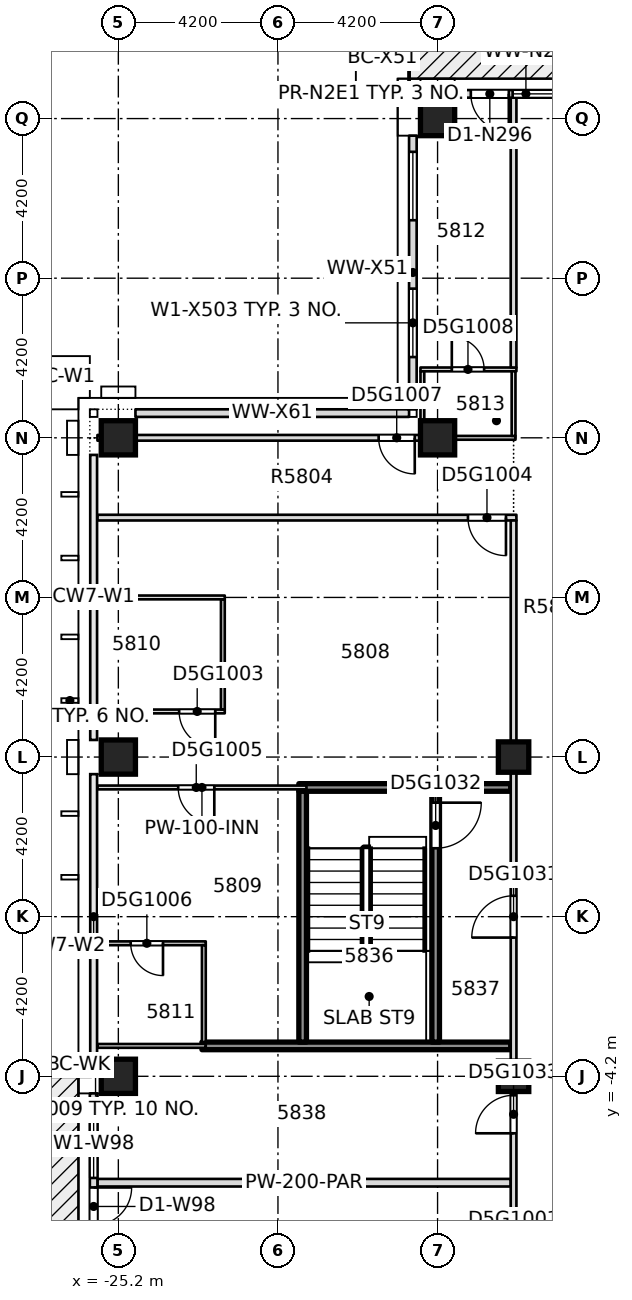
"""IFC4 building model, lengths in metres.
Left out: names, types, materials, properties, quantities, classifications, styles, units other than length and angle.
Written with IfcOpenShell. Run it as: python <this file> out.ifc"""

import sys

from ifc_helpers import new_model, si_unit, direction, frame, frame_2d, origin, origin_2d, place, context, subcontext, project, spatial, rectangle, extrude, element, fill, save


model = new_model("IFC4")
c1 = context("Model", 3, precision=1e-05, world=origin(), true_north=direction((0.0, 1.0)))
c2 = subcontext(c1, "Body", "Model", "MODEL_VIEW")
j1 = project(units=[si_unit("LENGTHUNIT", "METRE"), si_unit("PLANEANGLEUNIT", "RADIAN")], contexts=[c1])
p1 = place(None, origin())
s1 = spatial("IfcSite", under=j1, at=p1, CompositionType="ELEMENT")
p2 = place(p1, origin())
s2 = spatial("IfcBuilding", under=s1, at=p2, CompositionType="ELEMENT")
p3 = place(p2, frame((0.0, 0.0, 223.45)))
s3 = spatial("IfcBuildingStorey", under=s2, at=p3, CompositionType="ELEMENT", Elevation=223.45)
for number, where, z_axis, x_axis in (
    (1, (-25.2, -4.2, -0.4), (0.0, 0.0, 1.0), (1.0, 0.0, 0.0)),
    (2, (-25.2, 4.2, -0.4), (0.0, 0.0, 1.0), (1.0, 0.0, 0.0)),
    (3, (-25.2, 12.6, -0.4), (0.0, 0.0, 1.0), (1.0, 0.0, 0.0)),
    (4, (-16.8, 12.6, -0.4), (0.0, 0.0, 1.0), (1.0, 0.0, 0.0)),
    (5, (-16.8, 21.0, -0.4), (0.0, 0.0, 1.0), (1.0, 0.0, 0.0)),
):
    element("IfcColumn", number, at=place(p3, frame(where, z_axis=z_axis, x_axis=x_axis)), inside=s3, PredefinedType="COLUMN", context=c2, shape_type="SweptSolid", body=[
        extrude(rectangle(XDim=0.9, YDim=0.9, at=origin_2d()), origin(), (0.0, 0.0, 1.0), 3.45),
    ])
for number, where, z_axis, x_axis in (
    (6, (-14.8, -4.2, -0.4), (0.0, 0.0, 1.0), (1.0, 0.0, 0.0)),
    (7, (-14.8, 4.2, -0.4), (0.0, 0.0, 1.0), (1.0, 0.0, 0.0)),
):
    element("IfcColumn", number, at=place(p3, frame(where, z_axis=z_axis, x_axis=x_axis)), inside=s3, PredefinedType="COLUMN", context=c2, shape_type="SweptSolid", body=[
        extrude(rectangle(XDim=0.8, YDim=0.8, at=origin_2d()), origin(), (0.0, 0.0, 1.0), 3.45),
    ])
p4 = place(p3, frame((-25.75, -7.0, 0.0), z_axis=(0.0, 0.0, 1.0), x_axis=(1.0, 0.0, 0.0)))
e8 = element("IfcWall", 8, at=p4, inside=s3, PredefinedType="PARTITIONING", context=c2, shape_type="SweptSolid", body=[
    extrude(rectangle(XDim=10.875, YDim=0.2, at=frame_2d((5.438, 0.0))), origin(), (0.0, 0.0, 1.0), 3.05),
])
p5 = place(p3, frame((-25.75, -3.4, 0.0), z_axis=(0.0, 0.0, 1.0), x_axis=(1.0, 0.0, 0.0)))
e9 = element("IfcWall", 9, at=p5, inside=s3, PredefinedType="PARTITIONING", context=c2, shape_type="SweptSolid", body=[
    extrude(rectangle(XDim=2.85, YDim=0.1, at=frame_2d((1.425, 0.0))), origin(), (0.0, 0.0, 1.0), 3.05),
])
p6 = place(p3, frame((-23.0, -3.4, 0.0), z_axis=(0.0, 0.0, 1.0), x_axis=(1.0, 0.0, 0.0)))
e10 = element("IfcWall", 10, at=p6, inside=s3, PredefinedType="SOLIDWALL", context=c2, shape_type="SweptSolid", body=[
    extrude(rectangle(XDim=8.125, YDim=0.2, at=frame_2d((4.062, 0.0))), origin(), (0.0, 0.0, 1.0), 3.05),
])
p7 = place(p3, frame((-25.75, -0.7, 0.0), z_axis=(0.0, 0.0, 1.0), x_axis=(1.0, 0.0, 0.0)))
e11 = element("IfcWall", 11, at=p7, inside=s3, PredefinedType="PARTITIONING", context=c2, shape_type="SweptSolid", body=[
    extrude(rectangle(XDim=2.85, YDim=0.1, at=frame_2d((1.425, 0.0))), origin(), (0.0, 0.0, 1.0), 3.05),
])
p8 = place(p7, frame((0.875, 0.0, 0.0)))
e12 = element("IfcOpeningElement", 12, at=p8, cuts=e11, PredefinedType="OPENING", context=c2, shape_type="SweptSolid", body=[
    extrude(rectangle(XDim=0.85, YDim=2.1, at=frame_2d((0.425, 1.05))), frame((0.0, 0.06, 0.0), z_axis=(0.0, -1.0, 0.0), x_axis=(1.0, 0.0, 0.0)), (0.0, 0.0, 1.0), 0.12),
])
p9 = place(p3, frame((-25.75, 3.4, 0.0), z_axis=(0.0, 0.0, 1.0), x_axis=(1.0, 0.0, 0.0)))
e13 = element("IfcWall", 13, at=p9, inside=s3, PredefinedType="PARTITIONING", context=c2, shape_type="SweptSolid", body=[
    extrude(rectangle(XDim=5.5, YDim=0.1, at=frame_2d((2.75, 0.0))), origin(), (0.0, 0.0, 1.0), 3.05),
])
p10 = place(p9, frame((2.125, 0.0, 0.0)))
e14 = element("IfcOpeningElement", 14, at=p10, cuts=e13, PredefinedType="OPENING", context=c2, shape_type="SweptSolid", body=[
    extrude(rectangle(XDim=0.95, YDim=2.1, at=frame_2d((0.475, 1.05))), frame((0.0, 0.06, 0.0), z_axis=(0.0, -1.0, 0.0), x_axis=(1.0, 0.0, 0.0)), (0.0, 0.0, 1.0), 0.12),
])
p11 = place(p3, frame((-20.45, 3.4, 0.0), z_axis=(0.0, 0.0, 1.0), x_axis=(1.0, 0.0, 0.0)))
e15 = element("IfcWall", 15, at=p11, inside=s3, PredefinedType="SOLIDWALL", context=c2, shape_type="SweptSolid", body=[
    extrude(rectangle(XDim=5.575, YDim=0.2, at=frame_2d((2.788, 0.0))), origin(), (0.0, 0.0, 1.0), 3.05),
])
p12 = place(p3, frame((-25.75, 5.4, 0.0), z_axis=(0.0, 0.0, 1.0), x_axis=(1.0, 0.0, 0.0)))
e16 = element("IfcWall", 16, at=p12, inside=s3, PredefinedType="PARTITIONING", context=c2, shape_type="SweptSolid", body=[
    extrude(rectangle(XDim=3.35, YDim=0.1, at=frame_2d((1.675, 0.0))), origin(), (0.0, 0.0, 1.0), 3.05),
])
p13 = place(p12, frame((2.15, 0.0, 0.0)))
e17 = element("IfcOpeningElement", 17, at=p13, cuts=e16, PredefinedType="OPENING", context=c2, shape_type="SweptSolid", body=[
    extrude(rectangle(XDim=0.95, YDim=2.1, at=frame_2d((0.475, 1.05))), frame((0.0, 0.06, 0.0), z_axis=(0.0, -1.0, 0.0), x_axis=(1.0, 0.0, 0.0)), (0.0, 0.0, 1.0), 0.12),
])
p14 = place(p3, frame((-25.75, 8.4, 0.0), z_axis=(0.0, 0.0, 1.0), x_axis=(1.0, 0.0, 0.0)))
e18 = element("IfcWall", 18, at=p14, inside=s3, PredefinedType="PARTITIONING", context=c2, shape_type="SweptSolid", body=[
    extrude(rectangle(XDim=3.35, YDim=0.1, at=frame_2d((1.675, 0.0))), origin(), (0.0, 0.0, 1.0), 3.05),
])
p15 = place(p3, frame((-25.75, 10.5, 0.0), z_axis=(0.0, 0.0, 1.0), x_axis=(1.0, 0.0, 0.0)))
e19 = element("IfcWall", 19, at=p15, inside=s3, PredefinedType="PARTITIONING", context=c2, shape_type="SweptSolid", body=[
    extrude(rectangle(XDim=11.025, YDim=0.15, at=frame_2d((5.512, 0.0))), origin(), (0.0, 0.0, 1.0), 3.05),
])
p16 = place(p15, frame((9.75, 0.0, 0.0)))
e20 = element("IfcOpeningElement", 20, at=p16, cuts=e19, PredefinedType="OPENING", context=c2, shape_type="SweptSolid", body=[
    extrude(rectangle(XDim=1.0, YDim=2.1, at=frame_2d((0.5, 1.05))), frame((0.0, 0.085, 0.0), z_axis=(0.0, -1.0, 0.0), x_axis=(1.0, 0.0, 0.0)), (0.0, 0.0, 1.0), 0.17),
])
p17 = place(p3, frame((-25.75, 12.6, 0.0), z_axis=(0.0, 0.0, 1.0), x_axis=(1.0, 0.0, 0.0)))
e21 = element("IfcWall", 21, at=p17, inside=s3, PredefinedType="PARTITIONING", context=c2, shape_type="SweptSolid", body=[
    extrude(rectangle(XDim=1.0, YDim=0.15, at=frame_2d((0.5, 0.0))), origin(), (0.0, 0.0, 1.0), 3.05),
])
p18 = place(p3, frame((-17.25, 12.6, 0.0), z_axis=(0.0, 0.0, 1.0), x_axis=(1.0, 0.0, 0.0)))
e22 = element("IfcWall", 22, at=p18, inside=s3, PredefinedType="PARTITIONING", context=c2, shape_type="SweptSolid", body=[
    extrude(rectangle(XDim=2.5, YDim=0.1, at=frame_2d((1.25, 0.0))), origin(), (0.0, 0.0, 1.0), 3.05),
])
p19 = place(p3, frame((-17.25, 14.4, 0.0), z_axis=(0.0, 0.0, 1.0), x_axis=(1.0, 0.0, 0.0)))
e23 = element("IfcWall", 23, at=p19, inside=s3, PredefinedType="PARTITIONING", context=c2, shape_type="SweptSolid", body=[
    extrude(rectangle(XDim=2.525, YDim=0.1, at=frame_2d((1.262, 0.0))), origin(), (0.0, 0.0, 1.0), 3.05),
])
p20 = place(p19, frame((0.825, 0.0, 0.0)))
e24 = element("IfcOpeningElement", 24, at=p20, cuts=e23, PredefinedType="OPENING", context=c2, shape_type="SweptSolid", body=[
    extrude(rectangle(XDim=0.85, YDim=2.1, at=frame_2d((0.425, 1.05))), frame((0.0, 0.06, 0.0), z_axis=(0.0, -1.0, 0.0), x_axis=(1.0, 0.0, 0.0)), (0.0, 0.0, 1.0), 0.12),
])
p21 = place(p3, frame((-22.95, -3.3, 0.0), z_axis=(0.0, 0.0, 1.0), x_axis=(0.0, 1.0, 0.0)))
e25 = element("IfcWall", 25, at=p21, inside=s3, PredefinedType="PARTITIONING", context=c2, shape_type="SweptSolid", body=[
    extrude(rectangle(XDim=2.55, YDim=0.1, at=frame_2d((1.275, 0.0))), origin(), (0.0, 0.0, 1.0), 3.05),
])
p22 = place(p3, frame((-22.45, 5.45, 0.0), z_axis=(0.0, 0.0, 1.0), x_axis=(0.0, 1.0, 0.0)))
e26 = element("IfcWall", 26, at=p22, inside=s3, PredefinedType="PARTITIONING", context=c2, shape_type="SweptSolid", body=[
    extrude(rectangle(XDim=2.9, YDim=0.1, at=frame_2d((1.45, 0.0))), origin(), (0.0, 0.0, 1.0), 3.05),
])
p23 = place(p3, frame((-20.35, -3.3, 0.0), z_axis=(0.0, 0.0, 1.0), x_axis=(0.0, 1.0, 0.0)))
e27 = element("IfcWall", 27, at=p23, inside=s3, PredefinedType="SOLIDWALL", context=c2, shape_type="SweptSolid", body=[
    extrude(rectangle(XDim=6.6, YDim=0.2, at=frame_2d((3.3, 0.0))), origin(), (0.0, 0.0, 1.0), 3.05),
])
p24 = place(p3, frame((-17.2, 12.675, 0.0), z_axis=(0.0, 0.0, 1.0), x_axis=(0.0, 1.0, 0.0)))
e28 = element("IfcWall", 28, at=p24, inside=s3, PredefinedType="PARTITIONING", context=c2, shape_type="SweptSolid", body=[
    extrude(rectangle(XDim=1.675, YDim=0.1, at=frame_2d((0.837, 0.0))), origin(), (0.0, 0.0, 1.0), 3.05),
])
p25 = place(p3, frame((-16.85, -3.3, 0.0), z_axis=(0.0, 0.0, 1.0), x_axis=(0.0, 1.0, 0.0)))
e29 = element("IfcWall", 29, at=p25, inside=s3, PredefinedType="SOLIDWALL", context=c2, shape_type="SweptSolid", body=[
    extrude(rectangle(XDim=6.6, YDim=0.2, at=frame_2d((3.3, 0.0))), origin(), (0.0, 0.0, 1.0), 3.05),
])
p26 = place(p25, frame((5.1, 0.0, 0.0)))
e30 = element("IfcOpeningElement", 30, at=p26, cuts=e29, PredefinedType="OPENING", context=c2, shape_type="SweptSolid", body=[
    extrude(rectangle(XDim=1.2, YDim=2.1, at=frame_2d((0.6, 1.05))), frame((0.0, 0.11, 0.0), z_axis=(0.0, -1.0, 0.0), x_axis=(1.0, 0.0, 0.0)), (0.0, 0.0, 1.0), 0.22),
])
p27 = place(p3, frame((-14.8, -10.38, 0.0), z_axis=(0.0, 0.0, 1.0), x_axis=(0.0, 1.0, 0.0)))
e31 = element("IfcWall", 31, at=p27, inside=s3, PredefinedType="PARTITIONING", context=c2, shape_type="SweptSolid", body=[
    extrude(rectangle(XDim=20.805, YDim=0.15, at=frame_2d((10.402, 0.0))), origin(), (0.0, 0.0, 1.0), 3.05),
])
p28 = place(p27, frame((0.83, 0.0, 0.0)))
e32 = element("IfcOpeningElement", 32, at=p28, cuts=e31, PredefinedType="OPENING", context=c2, shape_type="SweptSolid", body=[
    extrude(rectangle(XDim=0.95, YDim=2.1, at=frame_2d((0.475, 1.05))), frame((0.0, 0.085, 0.0), z_axis=(0.0, -1.0, 0.0), x_axis=(1.0, 0.0, 0.0)), (0.0, 0.0, 1.0), 0.17),
])
p29 = place(p27, frame((9.83, 0.0, 0.0)))
e33 = element("IfcOpeningElement", 33, at=p29, cuts=e31, PredefinedType="OPENING", context=c2, shape_type="SweptSolid", body=[
    extrude(rectangle(XDim=1.1, YDim=2.1, at=frame_2d((0.55, 1.05))), frame((0.0, 0.085, 0.0), z_axis=(0.0, -1.0, 0.0), x_axis=(1.0, 0.0, 0.0)), (0.0, 0.0, 1.0), 0.17),
])
p30 = place(p27, frame((4.68, 0.0, 0.0)))
e34 = element("IfcOpeningElement", 34, at=p30, cuts=e31, PredefinedType="OPENING", context=c2, shape_type="SweptSolid", body=[
    extrude(rectangle(XDim=1.0, YDim=2.1, at=frame_2d((0.5, 1.05))), frame((0.0, 0.085, 0.0), z_axis=(0.0, -1.0, 0.0), x_axis=(1.0, 0.0, 0.0)), (0.0, 0.0, 1.0), 0.17),
])
p31 = place(p3, frame((-14.8, 12.65, 0.0), z_axis=(0.0, 0.0, 1.0), x_axis=(0.0, 1.0, 0.0)))
e35 = element("IfcWall", 35, at=p31, inside=s3, PredefinedType="PARTITIONING", context=c2, shape_type="SweptSolid", body=[
    extrude(rectangle(XDim=1.7, YDim=0.1, at=frame_2d((0.85, 0.0))), origin(), (0.0, 0.0, 1.0), 3.05),
])
p32 = place(p3, frame((-14.8, 14.45, 0.0), z_axis=(0.0, 0.0, 1.0), x_axis=(0.0, 1.0, 0.0)))
e36 = element("IfcWall", 36, at=p32, inside=s3, PredefinedType="PARTITIONING", context=c2, shape_type="SweptSolid", body=[
    extrude(rectangle(XDim=7.1, YDim=0.15, at=frame_2d((3.55, 0.0))), origin(), (0.0, 0.0, 1.0), 3.05),
])
p33 = place(p3, frame((-12.6, 21.65, 0.0), z_axis=(0.0, 0.0, 1.0), x_axis=(-1.0, 0.0, 0.0)))
e37 = element("IfcWall", 37, at=p33, inside=s3, PredefinedType="STANDARD", context=c2, shape_type="SweptSolid", body=[
    extrude(rectangle(XDim=3.75, YDim=0.2, at=frame_2d((1.875, 0.0))), origin(), (0.0, 0.0, 1.0), 3.05),
])
p34 = place(p33, frame((0.425, 0.0, 0.2)))
e38 = element("IfcOpeningElement", 38, at=p34, cuts=e37, PredefinedType="OPENING", context=c2, shape_type="SweptSolid", body=[
    extrude(rectangle(XDim=1.8, YDim=2.65, at=frame_2d((0.9, 1.325))), frame((0.0, 0.11, 0.0), z_axis=(0.0, -1.0, 0.0), x_axis=(1.0, 0.0, 0.0)), (0.0, 0.0, 1.0), 0.22),
])
p35 = place(p33, frame((2.325, 0.0, 0.0)))
e39 = element("IfcOpeningElement", 39, at=p35, cuts=e37, PredefinedType="OPENING", context=c2, shape_type="SweptSolid", body=[
    extrude(rectangle(XDim=1.0, YDim=2.4, at=frame_2d((0.5, 1.2))), frame((0.0, 0.11, 0.0), z_axis=(0.0, -1.0, 0.0), x_axis=(1.0, 0.0, 0.0)), (0.0, 0.0, 1.0), 0.22),
])
p36 = place(p3, frame((-17.45, 20.55, 0.0), z_axis=(0.0, 0.0, 1.0), x_axis=(0.0, -1.0, 0.0)))
e40 = element("IfcWall", 40, at=p36, inside=s3, PredefinedType="STANDARD", context=c2, shape_type="SweptSolid", body=[
    extrude(rectangle(XDim=7.2, YDim=0.2, at=frame_2d((3.6, 0.0))), origin(), (0.0, 0.0, 1.0), 3.05),
])
p37 = place(p36, frame((4.025, 0.0, 0.2)))
e41 = element("IfcOpeningElement", 41, at=p37, cuts=e40, PredefinedType="OPENING", context=c2, shape_type="SweptSolid", body=[
    extrude(rectangle(XDim=1.8, YDim=2.65, at=frame_2d((0.9, 1.325))), frame((0.0, 0.11, 0.0), z_axis=(0.0, -1.0, 0.0), x_axis=(1.0, 0.0, 0.0)), (0.0, 0.0, 1.0), 0.22),
])
p38 = place(p36, frame((0.425, 0.0, 0.2)))
e42 = element("IfcOpeningElement", 42, at=p38, cuts=e40, PredefinedType="OPENING", context=c2, shape_type="SweptSolid", body=[
    extrude(rectangle(XDim=1.8, YDim=2.65, at=frame_2d((0.9, 1.325))), frame((0.0, 0.11, 0.0), z_axis=(0.0, -1.0, 0.0), x_axis=(1.0, 0.0, 0.0)), (0.0, 0.0, 1.0), 0.22),
])
p39 = place(p3, frame((-17.55, 13.25, 0.0), z_axis=(0.0, 0.0, 1.0), x_axis=(-1.0, 0.0, 0.0)))
e43 = element("IfcWall", 43, at=p39, inside=s3, PredefinedType="STANDARD", context=c2, shape_type="SweptSolid", body=[
    extrude(rectangle(XDim=7.2, YDim=0.2, at=frame_2d((3.6, 0.0))), origin(), (0.0, 0.0, 1.0), 3.05),
])
p40 = place(p3, frame((-25.85, -4.65, 0.0), z_axis=(0.0, 0.0, 1.0), x_axis=(0.0, -1.0, 0.0)))
e44 = element("IfcWall", 44, at=p40, inside=s3, PredefinedType="STANDARD", context=c2, shape_type="SweptSolid", body=[
    extrude(rectangle(XDim=7.5, YDim=0.2, at=frame_2d((3.75, 0.0))), origin(), (0.0, 0.0, 1.0), 3.05),
])
p41 = place(p40, frame((4.175, 0.0, 0.2)))
e45 = element("IfcOpeningElement", 45, at=p41, cuts=e44, PredefinedType="OPENING", context=c2, shape_type="SweptSolid", body=[
    extrude(rectangle(XDim=1.8, YDim=2.65, at=frame_2d((0.9, 1.325))), frame((0.0, 0.11, 0.0), z_axis=(0.0, -1.0, 0.0), x_axis=(1.0, 0.0, 0.0)), (0.0, 0.0, 1.0), 0.22),
])
p42 = place(p40, frame((6.075, 0.0, 0.0)))
e46 = element("IfcOpeningElement", 46, at=p42, cuts=e44, PredefinedType="OPENING", context=c2, shape_type="SweptSolid", body=[
    extrude(rectangle(XDim=1.0, YDim=2.4, at=frame_2d((0.5, 1.2))), frame((0.0, 0.11, 0.0), z_axis=(0.0, -1.0, 0.0), x_axis=(1.0, 0.0, 0.0)), (0.0, 0.0, 1.0), 0.22),
])
p43 = place(p40, frame((0.425, 0.0, 0.2)))
e47 = element("IfcOpeningElement", 47, at=p43, cuts=e44, PredefinedType="OPENING", context=c2, shape_type="SweptSolid", body=[
    extrude(rectangle(XDim=1.8, YDim=2.65, at=frame_2d((0.9, 1.325))), frame((0.0, 0.11, 0.0), z_axis=(0.0, -1.0, 0.0), x_axis=(1.0, 0.0, 0.0)), (0.0, 0.0, 1.0), 0.22),
])
p44 = place(p40, frame((2.475, 0.0, 0.0)))
e48 = element("IfcOpeningElement", 48, at=p44, cuts=e44, PredefinedType="OPENING", context=c2, shape_type="SweptSolid", body=[
    extrude(rectangle(XDim=1.0, YDim=2.4, at=frame_2d((0.5, 1.2))), frame((0.0, 0.11, 0.0), z_axis=(0.0, -1.0, 0.0), x_axis=(1.0, 0.0, 0.0)), (0.0, 0.0, 1.0), 0.22),
])
p45 = place(p3, frame((-24.75, 12.6, 0.0), z_axis=(0.0, 0.0, 1.0), x_axis=(1.0, 0.0, 0.0)))
e49 = element("IfcWall", 49, at=p45, inside=s3, PredefinedType="PARTITIONING", context=c2, shape_type="SweptSolid", body=[
    extrude(rectangle(XDim=7.5, YDim=0.15, at=frame_2d((3.75, 0.0))), origin(), (0.0, 0.0, 1.0), 2.5),
])
p46 = place(p45, frame((6.4, 0.0, 0.0)))
e50 = element("IfcOpeningElement", 50, at=p46, cuts=e49, PredefinedType="OPENING", context=c2, shape_type="SweptSolid", body=[
    extrude(rectangle(XDim=0.95, YDim=2.1, at=frame_2d((0.475, 1.05))), frame((0.0, 0.085, 0.0), z_axis=(0.0, -1.0, 0.0), x_axis=(1.0, 0.0, 0.0)), (0.0, 0.0, 1.0), 0.17),
])
p47 = place(p3, frame((-17.25, 12.6, 0.0), z_axis=(0.0, 0.0, 1.0), x_axis=(1.0, 0.0, 0.0)))
e51 = element("IfcWall", 51, at=p47, inside=s3, PredefinedType="PARTITIONING", context=c2, shape_type="SweptSolid", body=[
    extrude(rectangle(XDim=0.1, YDim=0.15, at=frame_2d((0.05, 0.0))), origin(), (0.0, 0.0, 1.0), 3.05),
])
p48 = place(p13, origin())
e52 = element("IfcDoor", 52, at=p48, inside=s3, OperationType="SINGLE_SWING_RIGHT", PredefinedType="DOOR", context=c2, shape_type="SweptSolid", body=[
    extrude(rectangle(XDim=0.95, YDim=2.1, at=frame_2d((0.475, 1.05))), frame((0.0, 0.025, 0.0), z_axis=(0.0, -1.0, 0.0), x_axis=(1.0, 0.0, 0.0)), (0.0, 0.0, 1.0), 0.05),
])
fill(e17, e52)
p49 = place(p16, origin())
e53 = element("IfcDoor", 53, at=p49, inside=s3, OperationType="SINGLE_SWING_RIGHT", PredefinedType="DOOR", context=c2, shape_type="SweptSolid", body=[
    extrude(rectangle(XDim=1.0, YDim=2.1, at=frame_2d((0.5, 1.05))), frame((0.0, 0.025, 0.0), z_axis=(0.0, -1.0, 0.0), x_axis=(1.0, 0.0, 0.0)), (0.0, 0.0, 1.0), 0.05),
])
fill(e20, e53)
p50 = place(p10, origin())
e54 = element("IfcDoor", 54, at=p50, inside=s3, OperationType="SINGLE_SWING_LEFT", PredefinedType="DOOR", context=c2, shape_type="SweptSolid", body=[
    extrude(rectangle(XDim=0.95, YDim=2.1, at=frame_2d((0.475, 1.05))), frame((0.0, 0.025, 0.0), z_axis=(0.0, -1.0, 0.0), x_axis=(1.0, 0.0, 0.0)), (0.0, 0.0, 1.0), 0.05),
])
fill(e14, e54)
p51 = place(p8, origin())
e55 = element("IfcDoor", 55, at=p51, inside=s3, OperationType="SINGLE_SWING_RIGHT", PredefinedType="DOOR", context=c2, shape_type="SweptSolid", body=[
    extrude(rectangle(XDim=0.85, YDim=2.1, at=frame_2d((0.425, 1.05))), frame((0.0, 0.025, 0.0), z_axis=(0.0, -1.0, 0.0), x_axis=(1.0, 0.0, 0.0)), (0.0, 0.0, 1.0), 0.05),
])
fill(e12, e55)
p52 = place(p46, origin())
e56 = element("IfcDoor", 56, at=p52, inside=s3, OperationType="SINGLE_SWING_LEFT", PredefinedType="DOOR", context=c2, shape_type="SweptSolid", body=[
    extrude(rectangle(XDim=0.95, YDim=2.1, at=frame_2d((0.475, 1.05))), frame((0.0, 0.025, 0.0), z_axis=(0.0, -1.0, 0.0), x_axis=(1.0, 0.0, 0.0)), (0.0, 0.0, 1.0), 0.05),
])
fill(e50, e56)
p53 = place(p20, origin())
e57 = element("IfcDoor", 57, at=p53, inside=s3, OperationType="SINGLE_SWING_RIGHT", PredefinedType="DOOR", context=c2, shape_type="SweptSolid", body=[
    extrude(rectangle(XDim=0.85, YDim=2.1, at=frame_2d((0.425, 1.05))), frame((0.0, 0.025, 0.0), z_axis=(0.0, -1.0, 0.0), x_axis=(1.0, 0.0, 0.0)), (0.0, 0.0, 1.0), 0.05),
])
fill(e24, e57)
p54 = place(p29, origin())
e58 = element("IfcDoor", 58, at=p54, inside=s3, OperationType="SINGLE_SWING_RIGHT", PredefinedType="DOOR", context=c2, shape_type="SweptSolid", body=[
    extrude(rectangle(XDim=1.1, YDim=2.1, at=frame_2d((0.55, 1.05))), frame((0.0, 0.025, 0.0), z_axis=(0.0, -1.0, 0.0), x_axis=(1.0, 0.0, 0.0)), (0.0, 0.0, 1.0), 0.05),
])
fill(e33, e58)
p55 = place(p26, origin())
e59 = element("IfcDoor", 59, at=p55, inside=s3, OperationType="SINGLE_SWING_RIGHT", PredefinedType="DOOR", context=c2, shape_type="SweptSolid", body=[
    extrude(rectangle(XDim=1.2, YDim=2.1, at=frame_2d((0.6, 1.05))), frame((0.0, 0.025, 0.0), z_axis=(0.0, -1.0, 0.0), x_axis=(1.0, 0.0, 0.0)), (0.0, 0.0, 1.0), 0.05),
])
fill(e30, e59)
p56 = place(p30, origin())
e60 = element("IfcDoor", 60, at=p56, inside=s3, OperationType="SINGLE_SWING_LEFT", PredefinedType="DOOR", context=c2, shape_type="SweptSolid", body=[
    extrude(rectangle(XDim=1.0, YDim=2.1, at=frame_2d((0.5, 1.05))), frame((0.0, 0.025, 0.0), z_axis=(0.0, -1.0, 0.0), x_axis=(1.0, 0.0, 0.0)), (0.0, 0.0, 1.0), 0.05),
])
fill(e34, e60)
p57 = place(p34, origin())
e61 = element("IfcWindow", 61, at=p57, inside=s3, PartitioningType="SINGLE_PANEL", PredefinedType="WINDOW", context=c2, shape_type="SweptSolid", body=[
    extrude(rectangle(XDim=1.8, YDim=2.65, at=frame_2d((0.9, 1.325))), frame((0.0, 0.03, 0.0), z_axis=(0.0, -1.0, 0.0), x_axis=(1.0, 0.0, 0.0)), (0.0, 0.0, 1.0), 0.06),
])
fill(e38, e61)
p58 = place(p35, origin())
e62 = element("IfcDoor", 62, at=p58, inside=s3, OperationType="SINGLE_SWING_LEFT", PredefinedType="DOOR", context=c2, shape_type="SweptSolid", body=[
    extrude(rectangle(XDim=1.0, YDim=2.4, at=frame_2d((0.5, 1.2))), frame((0.0, 0.025, 0.0), z_axis=(0.0, -1.0, 0.0), x_axis=(1.0, 0.0, 0.0)), (0.0, 0.0, 1.0), 0.05),
])
fill(e39, e62)
p59 = place(p37, origin())
e63 = element("IfcWindow", 63, at=p59, inside=s3, PartitioningType="SINGLE_PANEL", PredefinedType="WINDOW", context=c2, shape_type="SweptSolid", body=[
    extrude(rectangle(XDim=1.8, YDim=2.65, at=frame_2d((0.9, 1.325))), frame((0.0, 0.03, 0.0), z_axis=(0.0, -1.0, 0.0), x_axis=(1.0, 0.0, 0.0)), (0.0, 0.0, 1.0), 0.06),
])
fill(e41, e63)
p60 = place(p38, origin())
e64 = element("IfcWindow", 64, at=p60, inside=s3, PartitioningType="SINGLE_PANEL", PredefinedType="WINDOW", context=c2, shape_type="SweptSolid", body=[
    extrude(rectangle(XDim=1.8, YDim=2.65, at=frame_2d((0.9, 1.325))), frame((0.0, 0.03, 0.0), z_axis=(0.0, -1.0, 0.0), x_axis=(1.0, 0.0, 0.0)), (0.0, 0.0, 1.0), 0.06),
])
fill(e42, e64)
p61 = place(p43, origin())
e65 = element("IfcWindow", 65, at=p61, inside=s3, PartitioningType="SINGLE_PANEL", PredefinedType="WINDOW", context=c2, shape_type="SweptSolid", body=[
    extrude(rectangle(XDim=1.8, YDim=2.65, at=frame_2d((0.9, 1.325))), frame((0.0, 0.03, 0.0), z_axis=(0.0, -1.0, 0.0), x_axis=(1.0, 0.0, 0.0)), (0.0, 0.0, 1.0), 0.06),
])
fill(e47, e65)
p62 = place(p44, origin())
e66 = element("IfcDoor", 66, at=p62, inside=s3, OperationType="SINGLE_SWING_LEFT", PredefinedType="DOOR", context=c2, shape_type="SweptSolid", body=[
    extrude(rectangle(XDim=1.0, YDim=2.4, at=frame_2d((0.5, 1.2))), frame((0.0, 0.025, 0.0), z_axis=(0.0, -1.0, 0.0), x_axis=(1.0, 0.0, 0.0)), (0.0, 0.0, 1.0), 0.05),
])
fill(e48, e66)
save(model, sys.argv[1])
